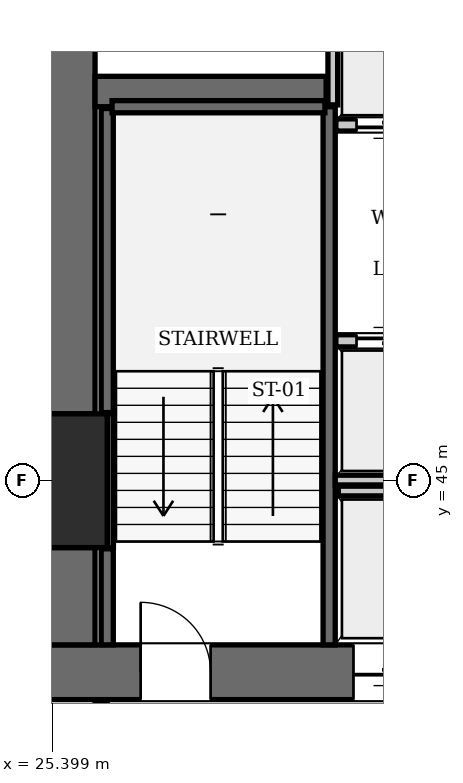
"""IFC4 building model, lengths in metres.
Left out: names, types, materials, properties, quantities, classifications, styles, units other than length and angle.
Written with IfcOpenShell. Run it as: python <this file> out.ifc"""

import sys

from ifc_helpers import new_model, si_unit, direction, frame, frame_2d, origin, origin_2d, place, context, subcontext, project, spatial, rectangle, extrude, element, fill, save


model = new_model("IFC4")
c1 = context("Model", 3, precision=1e-05, world=origin(), true_north=direction((0.0, 1.0)))
c2 = subcontext(c1, "Body", "Model", "MODEL_VIEW")
j1 = project(units=[si_unit("LENGTHUNIT", "METRE"), si_unit("PLANEANGLEUNIT", "RADIAN")], contexts=[c1])
p1 = place(None, origin())
s1 = spatial("IfcSite", under=j1, at=p1, CompositionType="ELEMENT")
p2 = place(p1, origin())
s2 = spatial("IfcBuilding", under=s1, at=p2, CompositionType="ELEMENT")
p3 = place(p2, frame((0.0, 0.0, 50.05)))
s3 = spatial("IfcBuildingStorey", under=s2, at=p3, CompositionType="ELEMENT", Elevation=50.05)
p4 = place(p3, frame((25.2, 45.0, 0.0), z_axis=(0.0, 0.0, 1.0), x_axis=(1.0, 0.0, 0.0)))
e1 = element("IfcColumn", 1, at=p4, inside=s3, PredefinedType="COLUMN", context=c2, shape_type="SweptSolid", body=[
    extrude(rectangle(XDim=2.2, YDim=2.2, at=origin_2d()), origin(), (0.0, 0.0, 1.0), 3.85),
])
p5 = place(p3, frame((25.2, 41.85, 0.0), z_axis=(0.0, 0.0, 1.0), x_axis=(1.0, 0.0, 0.0)))
e2 = element("IfcWall", 2, at=p5, inside=s3, PredefinedType="SHEAR", context=c2, shape_type="SweptSolid", body=[
    extrude(rectangle(XDim=6.8, YDim=0.9, at=frame_2d((3.4, 0.0))), origin(), (0.0, 0.0, 1.0), 3.85),
])
p6 = place(p5, frame((1.65, 0.0, 0.0)))
e3 = element("IfcOpeningElement", 3, at=p6, cuts=e2, PredefinedType="OPENING", context=c2, shape_type="SweptSolid", body=[
    extrude(rectangle(XDim=1.15, YDim=2.15, at=frame_2d((0.575, 1.075))), frame((0.0, 0.46, 0.0), z_axis=(0.0, -1.0, 0.0), x_axis=(1.0, 0.0, 0.0)), (0.0, 0.0, 1.0), 0.92),
])
p7 = place(p5, frame((5.15, 0.0, 0.0)))
e4 = element("IfcOpeningElement", 4, at=p7, cuts=e2, PredefinedType="OPENING", context=c2, shape_type="SweptSolid", body=[
    extrude(rectangle(XDim=1.1, YDim=2.2, at=frame_2d((0.55, 1.1))), frame((0.0, 0.46, 0.0), z_axis=(0.0, -1.0, 0.0), x_axis=(1.0, 0.0, 0.0)), (0.0, 0.0, 1.0), 0.92),
])
p8 = place(p3, frame((25.65, 42.3, 0.0), z_axis=(0.0, 0.0, 1.0), x_axis=(0.0, 1.0, 0.0)))
e5 = element("IfcWall", 5, at=p8, inside=s3, PredefinedType="SHEAR", context=c2, shape_type="SweptSolid", body=[
    extrude(rectangle(XDim=1.6, YDim=0.9, at=frame_2d((0.8, 0.0))), origin(), (0.0, 0.0, 1.0), 3.85),
])
p9 = place(p3, frame((25.65, 46.1, 0.0), z_axis=(0.0, 0.0, 1.0), x_axis=(0.0, 1.0, 0.0)))
e6 = element("IfcWall", 6, at=p9, inside=s3, PredefinedType="SHEAR", context=c2, shape_type="SweptSolid", body=[
    extrude(rectangle(XDim=7.0, YDim=0.9, at=frame_2d((3.5, 0.0))), origin(), (0.0, 0.0, 1.0), 3.85),
])
p10 = place(p3, frame((26.1, 51.4, 0.0), z_axis=(0.0, 0.0, 1.0), x_axis=(1.0, 0.0, 0.0)))
e7 = element("IfcWall", 7, at=p10, inside=s3, PredefinedType="SHEAR", context=c2, shape_type="SweptSolid", body=[
    extrude(rectangle(XDim=3.8, YDim=0.5, at=frame_2d((1.9, 0.0))), origin(), (0.0, 0.0, 1.0), 3.85),
])
p11 = place(p3, frame((29.95, 42.3, 0.0), z_axis=(0.0, 0.0, 1.0), x_axis=(0.0, 1.0, 0.0)))
e8 = element("IfcWall", 8, at=p11, inside=s3, PredefinedType="SOLIDWALL", context=c2, shape_type="SweptSolid", body=[
    extrude(rectangle(XDim=8.85, YDim=0.2, at=frame_2d((4.425, 0.0))), origin(), (0.0, 0.0, 1.0), 3.61),
])
p12 = place(p3, frame((26.3, 42.3, 0.0), z_axis=(0.0, 0.0, 1.0), x_axis=(0.0, 1.0, 0.0)))
e9 = element("IfcWall", 9, at=p12, inside=s3, PredefinedType="SOLIDWALL", context=c2, shape_type="SweptSolid", body=[
    extrude(rectangle(XDim=1.58, YDim=0.2, at=frame_2d((0.79, 0.0))), origin(), (0.0, 0.0, 1.0), 3.61),
])
p13 = place(p3, frame((26.3, 46.12, 0.0), z_axis=(0.0, 0.0, 1.0), x_axis=(0.0, 1.0, 0.0)))
e10 = element("IfcWall", 10, at=p13, inside=s3, PredefinedType="SOLIDWALL", context=c2, shape_type="SweptSolid", body=[
    extrude(rectangle(XDim=5.0, YDim=0.2, at=frame_2d((2.5, 0.0))), origin(), (0.0, 0.0, 1.0), 3.61),
])
p14 = place(p3, frame((26.38, 51.15, 0.0), z_axis=(0.0, 0.0, 1.0), x_axis=(1.0, 0.0, 0.0)))
e11 = element("IfcWall", 11, at=p14, inside=s3, PredefinedType="SOLIDWALL", context=c2, shape_type="SweptSolid", body=[
    extrude(rectangle(XDim=3.5, YDim=0.2, at=frame_2d((1.75, 0.0))), origin(), (0.0, 0.0, 1.0), 3.61),
])
p15 = place(p3, frame((26.352, 43.9, 0.0), z_axis=(0.0, 0.0, 1.0), x_axis=(0.0, 1.0, 0.0)))
e12 = element("IfcWall", 12, at=p15, inside=s3, PredefinedType="SOLIDWALL", context=c2, shape_type="SweptSolid", body=[
    extrude(rectangle(XDim=2.2, YDim=0.1, at=frame_2d((1.1, 0.0))), origin(), (0.0, 0.0, 1.0), 3.61),
])
p16 = place(p3, frame((30.06, 47.3, 0.0), z_axis=(0.0, 0.0, 1.0), x_axis=(1.0, 0.0, 0.0)))
e13 = element("IfcWall", 13, at=p16, inside=s3, PredefinedType="SOLIDWALL", context=c2, shape_type="SweptSolid", body=[
    extrude(rectangle(XDim=1.68, YDim=0.2, at=frame_2d((0.84, 0.0))), origin(), (0.0, 0.0, 1.0), 3.61),
])
p17 = place(p16, frame((0.34, 0.0, 0.0)))
e14 = element("IfcOpeningElement", 14, at=p17, cuts=e13, PredefinedType="OPENING", context=c2, shape_type="SweptSolid", body=[
    extrude(rectangle(XDim=1.0, YDim=2.15, at=frame_2d((0.5, 1.075))), frame((0.0, 0.11, 0.0), z_axis=(0.0, -1.0, 0.0), x_axis=(1.0, 0.0, 0.0)), (0.0, 0.0, 1.0), 0.22),
])
p18 = place(p3, frame((30.06, 50.85, 0.0), z_axis=(0.0, 0.0, 1.0), x_axis=(1.0, 0.0, 0.0)))
e15 = element("IfcWall", 15, at=p18, inside=s3, PredefinedType="SOLIDWALL", context=c2, shape_type="SweptSolid", body=[
    extrude(rectangle(XDim=1.68, YDim=0.2, at=frame_2d((0.84, 0.0))), origin(), (0.0, 0.0, 1.0), 3.61),
])
p19 = place(p18, frame((0.34, 0.0, 0.0)))
e16 = element("IfcOpeningElement", 16, at=p19, cuts=e15, PredefinedType="OPENING", context=c2, shape_type="SweptSolid", body=[
    extrude(rectangle(XDim=1.0, YDim=2.15, at=frame_2d((0.5, 1.075))), frame((0.0, 0.11, 0.0), z_axis=(0.0, -1.0, 0.0), x_axis=(1.0, 0.0, 0.0)), (0.0, 0.0, 1.0), 0.22),
])
p20 = place(p3, frame((30.1, 44.83, 0.0), z_axis=(0.0, 0.0, 1.0), x_axis=(1.0, 0.0, 0.0)))
e17 = element("IfcWall", 17, at=p20, inside=s3, PredefinedType="SOLIDWALL", context=c2, shape_type="SweptSolid", body=[
    extrude(rectangle(XDim=1.6, YDim=0.16, at=frame_2d((0.8, 0.0))), origin(), (0.0, 0.0, 1.0), 3.61),
])
p21 = place(p3, frame((30.05, 45.01, 0.0), z_axis=(0.0, 0.0, 1.0), x_axis=(1.0, 0.0, 0.0)))
e18 = element("IfcWall", 18, at=p21, inside=s3, PredefinedType="SOLIDWALL", context=c2, shape_type="SweptSolid", body=[
    extrude(rectangle(XDim=3.45, YDim=0.16, at=frame_2d((1.725, 0.0))), origin(), (0.0, 0.0, 1.0), 3.61),
])
p22 = place(p3, frame((30.01, 51.18, 0.0), z_axis=(0.0, 0.0, 1.0), x_axis=(0.0, 1.0, 0.0)))
e19 = element("IfcWall", 19, at=p22, inside=s3, PredefinedType="SOLIDWALL", context=c2, shape_type="SweptSolid", body=[
    extrude(rectangle(XDim=1.92, YDim=0.16, at=frame_2d((0.96, 0.0))), origin(), (0.0, 0.0, 1.0), 3.61),
])
p23 = place(p3, frame((26.2, 38.31, 0.0), z_axis=(0.0, 0.0, 1.0), x_axis=(0.0, 1.0, 0.0)))
e20 = element("IfcWall", 20, at=p23, inside=s3, PredefinedType="PARTITIONING", context=c2, shape_type="SweptSolid", body=[
    extrude(rectangle(XDim=3.07, YDim=0.2, at=frame_2d((1.535, 0.0))), origin(), (0.0, 0.0, 1.0), 3.61),
])
p24 = place(p6, origin())
e21 = element("IfcDoor", 21, at=p24, inside=s3, OperationType="SINGLE_SWING_LEFT", PredefinedType="DOOR", context=c2, shape_type="SweptSolid", body=[
    extrude(rectangle(XDim=1.15, YDim=2.15, at=frame_2d((0.575, 1.075))), frame((0.0, 0.025, 0.0), z_axis=(0.0, -1.0, 0.0), x_axis=(1.0, 0.0, 0.0)), (0.0, 0.0, 1.0), 0.05),
])
fill(e3, e21)
p25 = place(p17, origin())
e22 = element("IfcDoor", 22, at=p25, inside=s3, OperationType="SLIDING_TO_LEFT", PredefinedType="DOOR", context=c2, shape_type="SweptSolid", body=[
    extrude(rectangle(XDim=1.0, YDim=2.15, at=frame_2d((0.5, 1.075))), frame((0.0, 0.025, 0.0), z_axis=(0.0, -1.0, 0.0), x_axis=(1.0, 0.0, 0.0)), (0.0, 0.0, 1.0), 0.05),
])
fill(e14, e22)
p26 = place(p19, frame((1.0, 0.0, 0.0), z_axis=(0.0, 0.0, 1.0), x_axis=(-1.0, 0.0, 0.0)))
e23 = element("IfcDoor", 23, at=p26, inside=s3, OperationType="SLIDING_TO_LEFT", PredefinedType="DOOR", context=c2, shape_type="SweptSolid", body=[
    extrude(rectangle(XDim=1.0, YDim=2.15, at=frame_2d((0.5, 1.075))), frame((0.0, 0.025, 0.0), z_axis=(0.0, -1.0, 0.0), x_axis=(1.0, 0.0, 0.0)), (0.0, 0.0, 1.0), 0.05),
])
fill(e16, e23)
p27 = place(p7, frame((1.1, 0.0, 0.0), z_axis=(0.0, 0.0, 1.0), x_axis=(-1.0, 0.0, 0.0)))
e24 = element("IfcDoor", 24, at=p27, inside=s3, OperationType="SLIDING_TO_LEFT", PredefinedType="DOOR", context=c2, shape_type="SweptSolid", body=[
    extrude(rectangle(XDim=1.1, YDim=2.2, at=frame_2d((0.55, 1.1))), frame((0.0, 0.025, 0.0), z_axis=(0.0, -1.0, 0.0), x_axis=(1.0, 0.0, 0.0)), (0.0, 0.0, 1.0), 0.05),
])
fill(e4, e24)
save(model, sys.argv[1])
